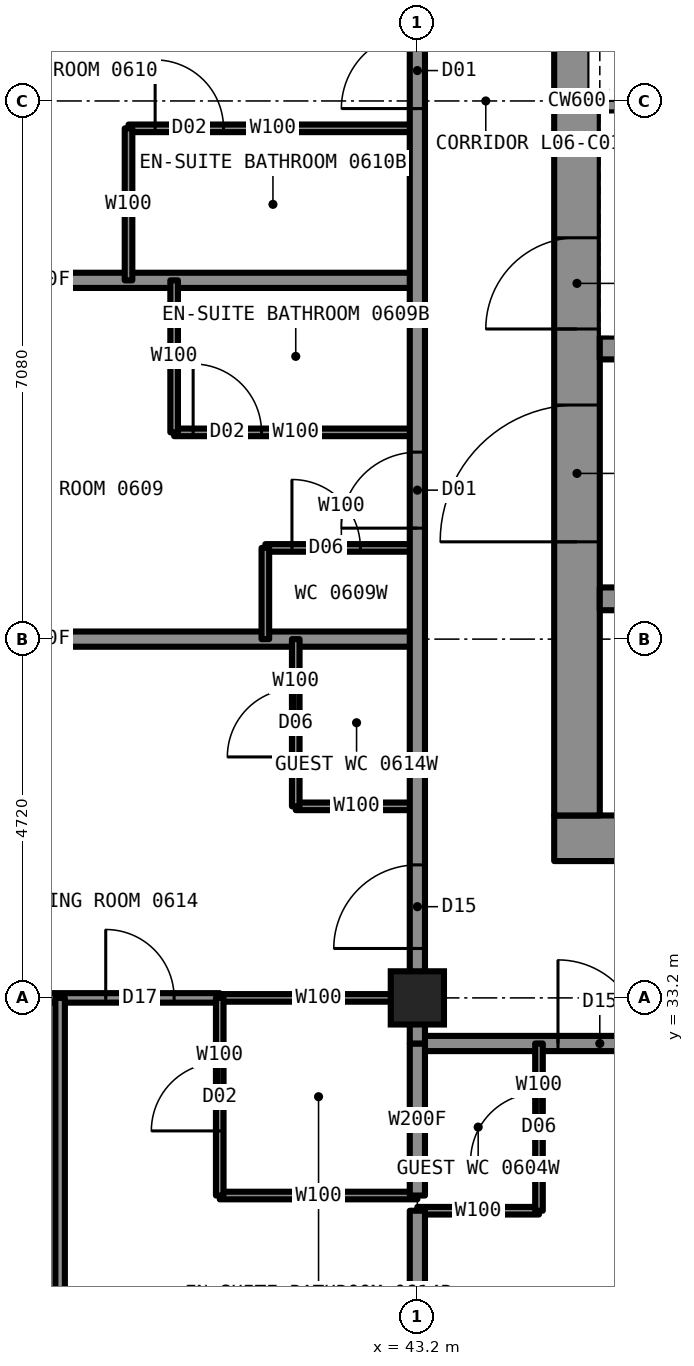
"""IFC4 building model, lengths in metres.
Left out: names, types, materials, properties, quantities, classifications, styles, units other than length and angle.
Written with IfcOpenShell. Run it as: python <this file> out.ifc"""

import sys

from ifc_helpers import new_model, si_unit, direction, frame, frame_2d, origin, origin_2d, place, context, subcontext, project, spatial, rectangle, hollow_rectangle, extrude, element, fill, save


model = new_model("IFC4")
c1 = context("Model", 3, precision=1e-05, world=origin(), true_north=direction((0.0, 1.0)))
c2 = subcontext(c1, "Body", "Model", "MODEL_VIEW")
j1 = project(units=[si_unit("LENGTHUNIT", "METRE"), si_unit("PLANEANGLEUNIT", "RADIAN")], contexts=[c1])
p1 = place(None, origin())
s1 = spatial("IfcSite", under=j1, at=p1, CompositionType="ELEMENT")
p2 = place(p1, origin())
s2 = spatial("IfcBuilding", under=s1, at=p2, CompositionType="ELEMENT")
p3 = place(p2, frame((0.0, 0.0, 28.5)))
s3 = spatial("IfcBuildingStorey", under=s2, at=p3, CompositionType="ELEMENT", Elevation=28.5)
p4 = place(p3, frame((43.2, 33.2, 0.0), z_axis=(0.0, 0.0, 1.0), x_axis=(1.0, 0.0, 0.0)))
e1 = element("IfcColumn", 1, at=p4, inside=s3, PredefinedType="COLUMN", context=c2, shape_type="SweptSolid", body=[
    extrude(hollow_rectangle(XDim=0.7, YDim=0.7, WallThickness=0.06, at=origin_2d()), origin(), (0.0, 0.0, 1.0), 3.5),
])
p5 = place(p3, frame((45.0, 35.3, 0.0), z_axis=(0.0, 0.0, 1.0), x_axis=(1.0, 0.0, 0.0)))
e2 = element("IfcWall", 2, at=p5, inside=s3, PredefinedType="SHEAR", context=c2, shape_type="SweptSolid", body=[
    extrude(rectangle(XDim=20.0, YDim=0.6, at=frame_2d((10.0, 0.0))), origin(), (0.0, 0.0, 1.0), 3.5),
])
p6 = place(p3, frame((45.3, 35.6, 0.0), z_axis=(0.0, 0.0, 1.0), x_axis=(0.0, 1.0, 0.0)))
e3 = element("IfcWall", 3, at=p6, inside=s3, PredefinedType="SHEAR", context=c2, shape_type="SweptSolid", body=[
    extrude(rectangle(XDim=18.8, YDim=0.6, at=frame_2d((9.4, 0.0))), origin(), (0.0, 0.0, 1.0), 3.5),
])
p7 = place(p6, frame((13.4, 0.0, 0.0)))
e4 = element("IfcOpeningElement", 4, at=p7, cuts=e3, PredefinedType="OPENING", context=c2, shape_type="SweptSolid", body=[
    extrude(rectangle(XDim=1.8, YDim=2.2, at=frame_2d((0.9, 1.1))), frame((0.0, 0.31, 0.0), z_axis=(0.0, -1.0, 0.0), x_axis=(1.0, 0.0, 0.0)), (0.0, 0.0, 1.0), 0.62),
])
p8 = place(p6, frame((3.6, 0.0, 0.0)))
e5 = element("IfcOpeningElement", 5, at=p8, cuts=e3, PredefinedType="OPENING", context=c2, shape_type="SweptSolid", body=[
    extrude(rectangle(XDim=1.8, YDim=2.2, at=frame_2d((0.9, 1.1))), frame((0.0, 0.31, 0.0), z_axis=(0.0, -1.0, 0.0), x_axis=(1.0, 0.0, 0.0)), (0.0, 0.0, 1.0), 0.62),
])
p9 = place(p6, frame((6.4, 0.0, 0.0)))
e6 = element("IfcOpeningElement", 6, at=p9, cuts=e3, PredefinedType="OPENING", context=c2, shape_type="SweptSolid", body=[
    extrude(rectangle(XDim=1.2, YDim=2.2, at=frame_2d((0.6, 1.1))), frame((0.0, 0.31, 0.0), z_axis=(0.0, -1.0, 0.0), x_axis=(1.0, 0.0, 0.0)), (0.0, 0.0, 1.0), 0.62),
])
p10 = place(p3, frame((45.6, 38.45, 0.0), z_axis=(0.0, 0.0, 1.0), x_axis=(1.0, 0.0, 0.0)))
e7 = element("IfcWall", 7, at=p10, inside=s3, PredefinedType="SHEAR", context=c2, shape_type="SweptSolid", body=[
    extrude(rectangle(XDim=18.8, YDim=0.3, at=frame_2d((9.4, 0.0))), origin(), (0.0, 0.0, 1.0), 3.5),
])
p11 = place(p3, frame((45.6, 41.75, 0.0), z_axis=(0.0, 0.0, 1.0), x_axis=(1.0, 0.0, 0.0)))
e8 = element("IfcWall", 8, at=p11, inside=s3, PredefinedType="SHEAR", context=c2, shape_type="SweptSolid", body=[
    extrude(rectangle(XDim=7.1, YDim=0.3, at=frame_2d((3.55, 0.0))), origin(), (0.0, 0.0, 1.0), 3.5),
])
p12 = place(p3, frame((45.6, 45.0, 0.0), z_axis=(0.0, 0.0, 1.0), x_axis=(1.0, 0.0, 0.0)))
e9 = element("IfcWall", 9, at=p12, inside=s3, PredefinedType="SHEAR", context=c2, shape_type="SweptSolid", body=[
    extrude(rectangle(XDim=6.8, YDim=0.3, at=frame_2d((3.4, 0.0))), origin(), (0.0, 0.0, 1.0), 3.5),
])
p13 = place(p3, frame((39.4, 44.64, 0.0), z_axis=(0.0, 0.0, 1.0), x_axis=(1.0, 0.0, 0.0)))
e10 = element("IfcWall", 10, at=p13, inside=s3, PredefinedType="PARTITIONING", context=c2, shape_type="SweptSolid", body=[
    extrude(rectangle(XDim=3.8, YDim=0.1, at=frame_2d((1.9, 0.0))), origin(), (0.0, 0.0, 1.0), 3.33),
])
p14 = place(p13, frame((0.35, 0.0, 0.0)))
e11 = element("IfcOpeningElement", 11, at=p14, cuts=e10, PredefinedType="OPENING", context=c2, shape_type="SweptSolid", body=[
    extrude(rectangle(XDim=0.9, YDim=2.1, at=frame_2d((0.45, 1.05))), frame((0.0, 0.06, 0.0), z_axis=(0.0, -1.0, 0.0), x_axis=(1.0, 0.0, 0.0)), (0.0, 0.0, 1.0), 0.12),
])
p15 = place(p3, frame((40.6, 33.2, 0.0), z_axis=(0.0, 0.0, 1.0), x_axis=(1.0, 0.0, 0.0)))
e12 = element("IfcWall", 12, at=p15, inside=s3, PredefinedType="PARTITIONING", context=c2, shape_type="SweptSolid", body=[
    extrude(rectangle(XDim=2.6, YDim=0.1, at=frame_2d((1.3, 0.0))), origin(), (0.0, 0.0, 1.0), 2.573),
])
p16 = place(p3, frame((33.3, 33.2, 0.0), z_axis=(0.0, 0.0, 1.0), x_axis=(1.0, 0.0, 0.0)))
e13 = element("IfcWall", 13, at=p16, inside=s3, PredefinedType="PARTITIONING", context=c2, shape_type="SweptSolid", body=[
    extrude(rectangle(XDim=7.3, YDim=0.125, at=frame_2d((3.65, 0.0))), origin(), (0.0, 0.0, 1.0), 2.573),
])
p17 = place(p16, frame((5.8, 0.0, 0.0)))
e14 = element("IfcOpeningElement", 14, at=p17, cuts=e13, PredefinedType="OPENING", context=c2, shape_type="SweptSolid", body=[
    extrude(rectangle(XDim=0.9, YDim=2.2, at=frame_2d((0.45, 1.1))), frame((0.0, 0.073, 0.0), z_axis=(0.0, -1.0, 0.0), x_axis=(1.0, 0.0, 0.0)), (0.0, 0.0, 1.0), 0.145),
])
p18 = place(p16, frame((2.0, 0.0, 0.0)))
e15 = element("IfcOpeningElement", 15, at=p18, cuts=e13, PredefinedType="OPENING", context=c2, shape_type="SweptSolid", body=[
    extrude(rectangle(XDim=0.9, YDim=2.2, at=frame_2d((0.45, 1.1))), frame((0.0, 0.073, 0.0), z_axis=(0.0, -1.0, 0.0), x_axis=(1.0, 0.0, 0.0)), (0.0, 0.0, 1.0), 0.145),
])
p19 = place(p3, frame((43.2, 32.6, 0.0), z_axis=(0.0, 0.0, 1.0), x_axis=(1.0, 0.0, 0.0)))
e16 = element("IfcWall", 16, at=p19, inside=s3, PredefinedType="PARTITIONING", context=c2, shape_type="SweptSolid", body=[
    extrude(rectangle(XDim=23.6, YDim=0.2, at=frame_2d((11.8, 0.0))), origin(), (0.0, 0.0, 1.0), 3.33),
])
p20 = place(p19, frame((1.85, 0.0, 0.0)))
e17 = element("IfcOpeningElement", 17, at=p20, cuts=e16, PredefinedType="OPENING", context=c2, shape_type="SweptSolid", body=[
    extrude(rectangle(XDim=1.1, YDim=2.2, at=frame_2d((0.55, 1.1))), frame((0.0, 0.11, 0.0), z_axis=(0.0, -1.0, 0.0), x_axis=(1.0, 0.0, 0.0)), (0.0, 0.0, 1.0), 0.22),
])
p21 = place(p19, frame((14.56, 0.0, 0.0)))
e18 = element("IfcOpeningElement", 18, at=p21, cuts=e16, PredefinedType="OPENING", context=c2, shape_type="SweptSolid", body=[
    extrude(rectangle(XDim=1.0, YDim=2.2, at=frame_2d((0.5, 1.1))), frame((0.0, 0.11, 0.0), z_axis=(0.0, -1.0, 0.0), x_axis=(1.0, 0.0, 0.0)), (0.0, 0.0, 1.0), 0.22),
])
p22 = place(p19, frame((19.28, 0.0, 0.0)))
e19 = element("IfcOpeningElement", 19, at=p22, cuts=e16, PredefinedType="OPENING", context=c2, shape_type="SweptSolid", body=[
    extrude(rectangle(XDim=1.0, YDim=2.2, at=frame_2d((0.5, 1.1))), frame((0.0, 0.11, 0.0), z_axis=(0.0, -1.0, 0.0), x_axis=(1.0, 0.0, 0.0)), (0.0, 0.0, 1.0), 0.22),
])
p23 = place(p3, frame((40.6, 30.6, 0.0), z_axis=(0.0, 0.0, 1.0), x_axis=(1.0, 0.0, 0.0)))
e20 = element("IfcWall", 20, at=p23, inside=s3, PredefinedType="PARTITIONING", context=c2, shape_type="SweptSolid", body=[
    extrude(rectangle(XDim=2.6, YDim=0.1, at=frame_2d((1.3, 0.0))), origin(), (0.0, 0.0, 1.0), 3.33),
])
p24 = place(p3, frame((43.2, 30.4, 0.0), z_axis=(0.0, 0.0, 1.0), x_axis=(1.0, 0.0, 0.0)))
e21 = element("IfcWall", 21, at=p24, inside=s3, PredefinedType="PARTITIONING", context=c2, shape_type="SweptSolid", body=[
    extrude(rectangle(XDim=1.6, YDim=0.1, at=frame_2d((0.8, 0.0))), origin(), (0.0, 0.0, 1.0), 3.33),
])
p25 = place(p3, frame((33.3, 42.64, 0.0), z_axis=(0.0, 0.0, 1.0), x_axis=(1.0, 0.0, 0.0)))
e22 = element("IfcWall", 22, at=p25, inside=s3, PredefinedType="PARTITIONING", context=c2, shape_type="SweptSolid", body=[
    extrude(rectangle(XDim=9.9, YDim=0.2, at=frame_2d((4.95, 0.0))), origin(), (0.0, 0.0, 1.0), 2.723),
])
p26 = place(p3, frame((40.0, 40.64, 0.0), z_axis=(0.0, 0.0, 1.0), x_axis=(1.0, 0.0, 0.0)))
e23 = element("IfcWall", 23, at=p26, inside=s3, PredefinedType="PARTITIONING", context=c2, shape_type="SweptSolid", body=[
    extrude(rectangle(XDim=3.2, YDim=0.1, at=frame_2d((1.6, 0.0))), origin(), (0.0, 0.0, 1.0), 3.33),
])
p27 = place(p26, frame((0.25, 0.0, 0.0)))
e24 = element("IfcOpeningElement", 24, at=p27, cuts=e23, PredefinedType="OPENING", context=c2, shape_type="SweptSolid", body=[
    extrude(rectangle(XDim=0.9, YDim=2.1, at=frame_2d((0.45, 1.05))), frame((0.0, 0.06, 0.0), z_axis=(0.0, -1.0, 0.0), x_axis=(1.0, 0.0, 0.0)), (0.0, 0.0, 1.0), 0.12),
])
p28 = place(p3, frame((41.2, 39.12, 0.0), z_axis=(0.0, 0.0, 1.0), x_axis=(1.0, 0.0, 0.0)))
e25 = element("IfcWall", 25, at=p28, inside=s3, PredefinedType="PARTITIONING", context=c2, shape_type="SweptSolid", body=[
    extrude(rectangle(XDim=2.0, YDim=0.1, at=frame_2d((1.0, 0.0))), origin(), (0.0, 0.0, 1.0), 3.33),
])
p29 = place(p28, frame((0.35, 0.0, 0.0)))
e26 = element("IfcOpeningElement", 26, at=p29, cuts=e25, PredefinedType="OPENING", context=c2, shape_type="SweptSolid", body=[
    extrude(rectangle(XDim=0.9, YDim=2.1, at=frame_2d((0.45, 1.05))), frame((0.0, 0.06, 0.0), z_axis=(0.0, -1.0, 0.0), x_axis=(1.0, 0.0, 0.0)), (0.0, 0.0, 1.0), 0.12),
])
p30 = place(p3, frame((33.3, 37.92, 0.0), z_axis=(0.0, 0.0, 1.0), x_axis=(1.0, 0.0, 0.0)))
e27 = element("IfcWall", 27, at=p30, inside=s3, PredefinedType="PARTITIONING", context=c2, shape_type="SweptSolid", body=[
    extrude(rectangle(XDim=9.9, YDim=0.2, at=frame_2d((4.95, 0.0))), origin(), (0.0, 0.0, 1.0), 2.573),
])
p31 = place(p3, frame((41.6, 35.72, 0.0), z_axis=(0.0, 0.0, 1.0), x_axis=(1.0, 0.0, 0.0)))
e28 = element("IfcWall", 28, at=p31, inside=s3, PredefinedType="PARTITIONING", context=c2, shape_type="SweptSolid", body=[
    extrude(rectangle(XDim=1.6, YDim=0.1, at=frame_2d((0.8, 0.0))), origin(), (0.0, 0.0, 1.0), 2.723),
])
p32 = place(p3, frame((44.8, 30.4, 0.0), z_axis=(0.0, 0.0, 1.0), x_axis=(0.0, 1.0, 0.0)))
e29 = element("IfcWall", 29, at=p32, inside=s3, PredefinedType="PARTITIONING", context=c2, shape_type="SweptSolid", body=[
    extrude(rectangle(XDim=2.2, YDim=0.1, at=frame_2d((1.1, 0.0))), origin(), (0.0, 0.0, 1.0), 3.33),
])
p33 = place(p32, frame((0.65, 0.0, 0.0)))
e30 = element("IfcOpeningElement", 30, at=p33, cuts=e29, PredefinedType="OPENING", context=c2, shape_type="SweptSolid", body=[
    extrude(rectangle(XDim=0.9, YDim=2.1, at=frame_2d((0.45, 1.05))), frame((0.0, 0.06, 0.0), z_axis=(0.0, -1.0, 0.0), x_axis=(1.0, 0.0, 0.0)), (0.0, 0.0, 1.0), 0.12),
])
p34 = place(p3, frame((43.2, 33.22, 0.0), z_axis=(0.0, 0.0, 1.0), x_axis=(0.0, 1.0, 0.0)))
e31 = element("IfcWall", 31, at=p34, inside=s3, PredefinedType="PARTITIONING", context=c2, shape_type="SweptSolid", body=[
    extrude(rectangle(XDim=23.56, YDim=0.2, at=frame_2d((11.78, 0.0))), origin(), (0.0, 0.0, 1.0), 3.33),
])
p35 = place(p34, frame((6.16, 0.0, 0.0)))
e32 = element("IfcOpeningElement", 32, at=p35, cuts=e31, PredefinedType="OPENING", context=c2, shape_type="SweptSolid", body=[
    extrude(rectangle(XDim=1.0, YDim=2.2, at=frame_2d((0.5, 1.1))), frame((0.0, 0.11, 0.0), z_axis=(0.0, -1.0, 0.0), x_axis=(1.0, 0.0, 0.0)), (0.0, 0.0, 1.0), 0.22),
])
p36 = place(p34, frame((11.68, 0.0, 0.0)))
e33 = element("IfcOpeningElement", 33, at=p36, cuts=e31, PredefinedType="OPENING", context=c2, shape_type="SweptSolid", body=[
    extrude(rectangle(XDim=1.0, YDim=2.2, at=frame_2d((0.5, 1.1))), frame((0.0, 0.11, 0.0), z_axis=(0.0, -1.0, 0.0), x_axis=(1.0, 0.0, 0.0)), (0.0, 0.0, 1.0), 0.22),
])
p37 = place(p34, frame((14.54, 0.0, 0.0)))
e34 = element("IfcOpeningElement", 34, at=p37, cuts=e31, PredefinedType="OPENING", context=c2, shape_type="SweptSolid", body=[
    extrude(rectangle(XDim=1.0, YDim=2.2, at=frame_2d((0.5, 1.1))), frame((0.0, 0.11, 0.0), z_axis=(0.0, -1.0, 0.0), x_axis=(1.0, 0.0, 0.0)), (0.0, 0.0, 1.0), 0.22),
])
p38 = place(p34, frame((21.83, 0.0, 0.0)))
e35 = element("IfcOpeningElement", 35, at=p38, cuts=e31, PredefinedType="OPENING", context=c2, shape_type="SweptSolid", body=[
    extrude(rectangle(XDim=1.1, YDim=2.2, at=frame_2d((0.55, 1.1))), frame((0.0, 0.11, 0.0), z_axis=(0.0, -1.0, 0.0), x_axis=(1.0, 0.0, 0.0)), (0.0, 0.0, 1.0), 0.22),
])
p39 = place(p34, frame((0.63, 0.0, 0.0)))
e36 = element("IfcOpeningElement", 36, at=p39, cuts=e31, PredefinedType="OPENING", context=c2, shape_type="SweptSolid", body=[
    extrude(rectangle(XDim=1.1, YDim=2.2, at=frame_2d((0.55, 1.1))), frame((0.0, 0.11, 0.0), z_axis=(0.0, -1.0, 0.0), x_axis=(1.0, 0.0, 0.0)), (0.0, 0.0, 1.0), 0.22),
])
p40 = place(p3, frame((43.2, 23.3, 0.0), z_axis=(0.0, 0.0, 1.0), x_axis=(0.0, 1.0, 0.0)))
e37 = element("IfcWall", 37, at=p40, inside=s3, PredefinedType="PARTITIONING", context=c2, shape_type="SweptSolid", body=[
    extrude(rectangle(XDim=7.1, YDim=0.2, at=frame_2d((3.55, 0.0))), origin(), (0.0, 0.0, 1.0), 2.573),
])
p41 = place(p3, frame((43.2, 30.6, 0.0), z_axis=(0.0, 0.0, 1.0), x_axis=(0.0, 1.0, 0.0)))
e38 = element("IfcWall", 38, at=p41, inside=s3, PredefinedType="PARTITIONING", context=c2, shape_type="SweptSolid", body=[
    extrude(rectangle(XDim=2.0, YDim=0.2, at=frame_2d((1.0, 0.0))), origin(), (0.0, 0.0, 1.0), 2.573),
])
p42 = place(p3, frame((41.6, 35.72, 0.0), z_axis=(0.0, 0.0, 1.0), x_axis=(0.0, 1.0, 0.0)))
e39 = element("IfcWall", 39, at=p42, inside=s3, PredefinedType="PARTITIONING", context=c2, shape_type="SweptSolid", body=[
    extrude(rectangle(XDim=2.2, YDim=0.1, at=frame_2d((1.1, 0.0))), origin(), (0.0, 0.0, 1.0), 3.33),
])
p43 = place(p42, frame((0.65, 0.0, 0.0)))
e40 = element("IfcOpeningElement", 40, at=p43, cuts=e39, PredefinedType="OPENING", context=c2, shape_type="SweptSolid", body=[
    extrude(rectangle(XDim=0.9, YDim=2.1, at=frame_2d((0.45, 1.05))), frame((0.0, 0.06, 0.0), z_axis=(0.0, -1.0, 0.0), x_axis=(1.0, 0.0, 0.0)), (0.0, 0.0, 1.0), 0.12),
])
p44 = place(p3, frame((41.2, 37.92, 0.0), z_axis=(0.0, 0.0, 1.0), x_axis=(0.0, 1.0, 0.0)))
e41 = element("IfcWall", 41, at=p44, inside=s3, PredefinedType="PARTITIONING", context=c2, shape_type="SweptSolid", body=[
    extrude(rectangle(XDim=1.2, YDim=0.1, at=frame_2d((0.6, 0.0))), origin(), (0.0, 0.0, 1.0), 3.33),
])
p45 = place(p3, frame((40.6, 30.6, 0.0), z_axis=(0.0, 0.0, 1.0), x_axis=(0.0, 1.0, 0.0)))
e42 = element("IfcWall", 42, at=p45, inside=s3, PredefinedType="PARTITIONING", context=c2, shape_type="SweptSolid", body=[
    extrude(rectangle(XDim=2.6, YDim=0.1, at=frame_2d((1.3, 0.0))), origin(), (0.0, 0.0, 1.0), 3.33),
])
p46 = place(p45, frame((0.85, 0.0, 0.0)))
e43 = element("IfcOpeningElement", 43, at=p46, cuts=e42, PredefinedType="OPENING", context=c2, shape_type="SweptSolid", body=[
    extrude(rectangle(XDim=0.9, YDim=2.1, at=frame_2d((0.45, 1.05))), frame((0.0, 0.06, 0.0), z_axis=(0.0, -1.0, 0.0), x_axis=(1.0, 0.0, 0.0)), (0.0, 0.0, 1.0), 0.12),
])
for number, where, z_axis, x_axis in (
    (44, (40.0, 40.64, 0.0), (0.0, 0.0, 1.0), (0.0, 1.0, 0.0)),
    (45, (39.4, 42.64, 0.0), (0.0, 0.0, 1.0), (0.0, 1.0, 0.0)),
):
    element("IfcWall", number, at=place(p3, frame(where, z_axis=z_axis, x_axis=x_axis)), inside=s3, PredefinedType="PARTITIONING", context=c2, shape_type="SweptSolid", body=[
        extrude(rectangle(XDim=2.0, YDim=0.1, at=frame_2d((1.0, 0.0))), origin(), (0.0, 0.0, 1.0), 3.33),
    ])
p47 = place(p3, frame((38.5, 23.306, 0.0), z_axis=(0.0, 0.0, 1.0), x_axis=(0.0, 1.0, 0.0)))
e46 = element("IfcWall", 46, at=p47, inside=s3, PredefinedType="PARTITIONING", context=c2, shape_type="SweptSolid", body=[
    extrude(rectangle(XDim=9.894, YDim=0.125, at=frame_2d((4.947, 0.0))), origin(), (0.0, 0.0, 1.0), 3.33),
])
p48 = place(p3, frame((43.2, 32.6, 0.0), z_axis=(0.0, 0.0, 1.0), x_axis=(0.0, 1.0, 0.0)))
e47 = element("IfcWall", 47, at=p48, inside=s3, PredefinedType="PARTITIONING", context=c2, shape_type="SweptSolid", body=[
    extrude(rectangle(XDim=0.62, YDim=0.2, at=frame_2d((0.31, 0.0))), origin(), (0.0, 0.0, 1.0), 2.573),
])
p49 = place(p20, origin())
e48 = element("IfcDoor", 48, at=p49, inside=s3, OperationType="SINGLE_SWING_LEFT", PredefinedType="DOOR", context=c2, shape_type="SweptSolid", body=[
    extrude(rectangle(XDim=1.1, YDim=2.2, at=frame_2d((0.55, 1.1))), frame((0.0, 0.025, 0.0), z_axis=(0.0, -1.0, 0.0), x_axis=(1.0, 0.0, 0.0)), (0.0, 0.0, 1.0), 0.05),
])
fill(e17, e48)
p50 = place(p33, origin())
e49 = element("IfcDoor", 49, at=p50, inside=s3, OperationType="SINGLE_SWING_LEFT", PredefinedType="DOOR", context=c2, shape_type="SweptSolid", body=[
    extrude(rectangle(XDim=0.9, YDim=2.1, at=frame_2d((0.45, 1.05))), frame((0.0, 0.025, 0.0), z_axis=(0.0, -1.0, 0.0), x_axis=(1.0, 0.0, 0.0)), (0.0, 0.0, 1.0), 0.05),
])
fill(e30, e49)
p51 = place(p35, origin())
e50 = element("IfcDoor", 50, at=p51, inside=s3, OperationType="SINGLE_SWING_LEFT", PredefinedType="DOOR", context=c2, shape_type="SweptSolid", body=[
    extrude(rectangle(XDim=1.0, YDim=2.2, at=frame_2d((0.5, 1.1))), frame((0.0, 0.025, 0.0), z_axis=(0.0, -1.0, 0.0), x_axis=(1.0, 0.0, 0.0)), (0.0, 0.0, 1.0), 0.05),
])
fill(e32, e50)
p52 = place(p27, origin())
e51 = element("IfcDoor", 51, at=p52, inside=s3, OperationType="SINGLE_SWING_RIGHT", PredefinedType="DOOR", context=c2, shape_type="SweptSolid", body=[
    extrude(rectangle(XDim=0.9, YDim=2.1, at=frame_2d((0.45, 1.05))), frame((0.0, 0.025, 0.0), z_axis=(0.0, -1.0, 0.0), x_axis=(1.0, 0.0, 0.0)), (0.0, 0.0, 1.0), 0.05),
])
fill(e24, e51)
p53 = place(p29, origin())
e52 = element("IfcDoor", 52, at=p53, inside=s3, OperationType="SINGLE_SWING_LEFT", PredefinedType="DOOR", context=c2, shape_type="SweptSolid", body=[
    extrude(rectangle(XDim=0.9, YDim=2.1, at=frame_2d((0.45, 1.05))), frame((0.0, 0.025, 0.0), z_axis=(0.0, -1.0, 0.0), x_axis=(1.0, 0.0, 0.0)), (0.0, 0.0, 1.0), 0.05),
])
fill(e26, e52)
p54 = place(p36, origin())
e53 = element("IfcDoor", 53, at=p54, inside=s3, OperationType="SINGLE_SWING_LEFT", PredefinedType="DOOR", context=c2, shape_type="SweptSolid", body=[
    extrude(rectangle(XDim=1.0, YDim=2.2, at=frame_2d((0.5, 1.1))), frame((0.0, 0.025, 0.0), z_axis=(0.0, -1.0, 0.0), x_axis=(1.0, 0.0, 0.0)), (0.0, 0.0, 1.0), 0.05),
])
fill(e33, e53)
p55 = place(p14, origin())
e54 = element("IfcDoor", 54, at=p55, inside=s3, OperationType="SINGLE_SWING_RIGHT", PredefinedType="DOOR", context=c2, shape_type="SweptSolid", body=[
    extrude(rectangle(XDim=0.9, YDim=2.1, at=frame_2d((0.45, 1.05))), frame((0.0, 0.025, 0.0), z_axis=(0.0, -1.0, 0.0), x_axis=(1.0, 0.0, 0.0)), (0.0, 0.0, 1.0), 0.05),
])
fill(e11, e54)
p56 = place(p39, origin())
e55 = element("IfcDoor", 55, at=p56, inside=s3, OperationType="SINGLE_SWING_LEFT", PredefinedType="DOOR", context=c2, shape_type="SweptSolid", body=[
    extrude(rectangle(XDim=1.1, YDim=2.2, at=frame_2d((0.55, 1.1))), frame((0.0, 0.025, 0.0), z_axis=(0.0, -1.0, 0.0), x_axis=(1.0, 0.0, 0.0)), (0.0, 0.0, 1.0), 0.05),
])
fill(e36, e55)
p57 = place(p46, origin())
e56 = element("IfcDoor", 56, at=p57, inside=s3, OperationType="SINGLE_SWING_RIGHT", PredefinedType="DOOR", context=c2, shape_type="SweptSolid", body=[
    extrude(rectangle(XDim=0.9, YDim=2.1, at=frame_2d((0.45, 1.05))), frame((0.0, 0.025, 0.0), z_axis=(0.0, -1.0, 0.0), x_axis=(1.0, 0.0, 0.0)), (0.0, 0.0, 1.0), 0.05),
])
fill(e43, e56)
p58 = place(p17, origin())
e57 = element("IfcDoor", 57, at=p58, inside=s3, OperationType="SINGLE_SWING_LEFT", PredefinedType="DOOR", context=c2, shape_type="SweptSolid", body=[
    extrude(rectangle(XDim=0.9, YDim=2.2, at=frame_2d((0.45, 1.1))), frame((0.0, 0.025, 0.0), z_axis=(0.0, -1.0, 0.0), x_axis=(1.0, 0.0, 0.0)), (0.0, 0.0, 1.0), 0.05),
])
fill(e14, e57)
p59 = place(p43, origin())
e58 = element("IfcDoor", 58, at=p59, inside=s3, OperationType="SINGLE_SWING_LEFT", PredefinedType="DOOR", context=c2, shape_type="SweptSolid", body=[
    extrude(rectangle(XDim=0.9, YDim=2.1, at=frame_2d((0.45, 1.05))), frame((0.0, 0.025, 0.0), z_axis=(0.0, -1.0, 0.0), x_axis=(1.0, 0.0, 0.0)), (0.0, 0.0, 1.0), 0.05),
])
fill(e40, e58)
p60 = place(p8, origin())
e59 = element("IfcDoor", 59, at=p60, inside=s3, OperationType="DOUBLE_DOOR_SINGLE_SWING", PredefinedType="DOOR", context=c2, shape_type="SweptSolid", body=[
    extrude(rectangle(XDim=1.8, YDim=2.2, at=frame_2d((0.9, 1.1))), frame((0.0, 0.025, 0.0), z_axis=(0.0, -1.0, 0.0), x_axis=(1.0, 0.0, 0.0)), (0.0, 0.0, 1.0), 0.05),
])
fill(e5, e59)
p61 = place(p9, origin())
e60 = element("IfcDoor", 60, at=p61, inside=s3, OperationType="SINGLE_SWING_LEFT", PredefinedType="DOOR", context=c2, shape_type="SweptSolid", body=[
    extrude(rectangle(XDim=1.2, YDim=2.2, at=frame_2d((0.6, 1.1))), frame((0.0, 0.025, 0.0), z_axis=(0.0, -1.0, 0.0), x_axis=(1.0, 0.0, 0.0)), (0.0, 0.0, 1.0), 0.05),
])
fill(e6, e60)
save(model, sys.argv[1])
